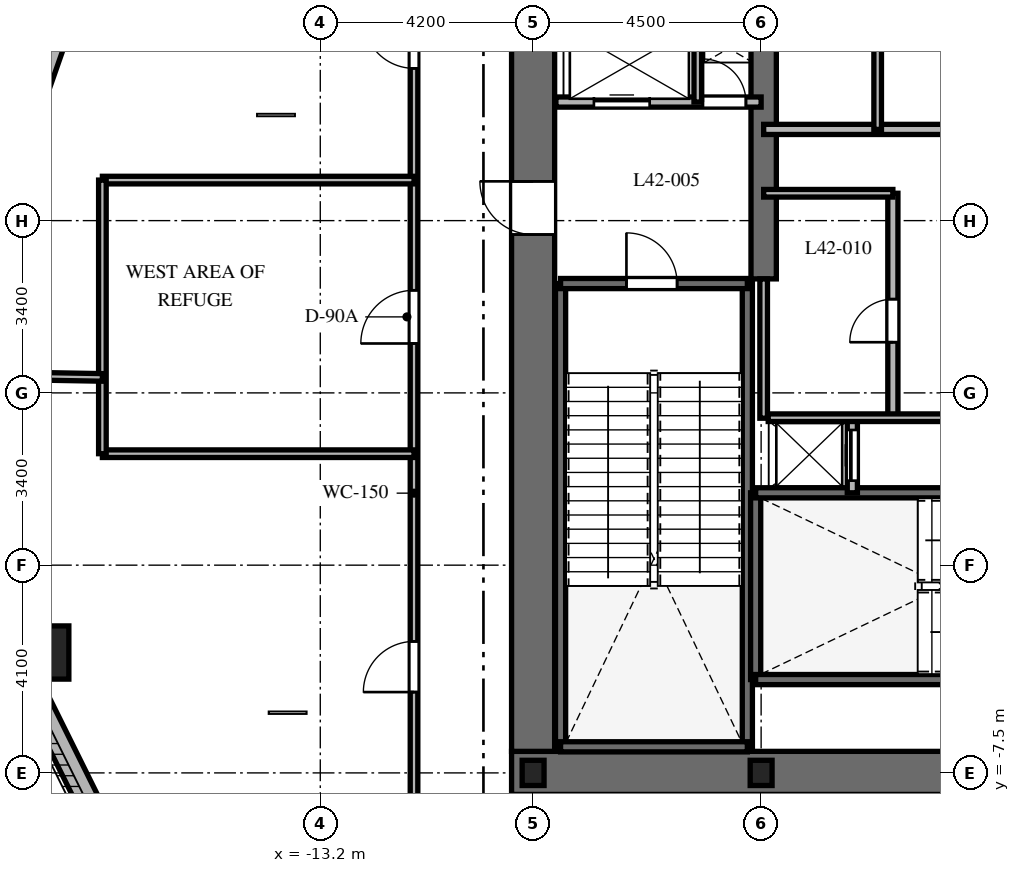
"""IFC4 building model, lengths in metres.
Left out: names, types, materials, properties, quantities, classifications, styles, units other than length and angle.
Written with IfcOpenShell. Run it as: python <this file> out.ifc"""

import sys

from ifc_helpers import new_model, si_unit, direction, frame, frame_2d, origin, origin_2d, place, context, subcontext, project, spatial, rectangle, i_section, extrude, element, fill, save


model = new_model("IFC4")
c1 = context("Model", 3, precision=1e-05, world=origin(), true_north=direction((0.0, 1.0)))
c2 = subcontext(c1, "Body", "Model", "MODEL_VIEW")
j1 = project(units=[si_unit("LENGTHUNIT", "METRE"), si_unit("PLANEANGLEUNIT", "RADIAN")], contexts=[c1])
p1 = place(None, origin())
s1 = spatial("IfcSite", under=j1, at=p1, CompositionType="ELEMENT")
p2 = place(p1, origin())
s2 = spatial("IfcBuilding", under=s1, at=p2, CompositionType="ELEMENT")
p3 = place(p2, frame((0.0, 0.0, 170.2)))
s3 = spatial("IfcBuildingStorey", under=s2, at=p3, CompositionType="ELEMENT", Elevation=170.2)
p4 = place(p3, frame((-9.425, -7.5, 0.0), z_axis=(0.0, 0.0, 1.0), x_axis=(1.0, 0.0, 0.0)))
e1 = element("IfcWall", 1, at=p4, inside=s3, PredefinedType="SHEAR", context=c2, shape_type="SweptSolid", body=[
    extrude(rectangle(XDim=18.85, YDim=0.85, at=frame_2d((9.425, 0.0))), origin(), (0.0, 0.0, 1.0), 5.4),
])
p5 = place(p4, frame((9.475, 0.0, 0.0)))
e2 = element("IfcOpeningElement", 2, at=p5, cuts=e1, PredefinedType="OPENING", context=c2, shape_type="SweptSolid", body=[
    extrude(rectangle(XDim=1.0, YDim=2.15, at=frame_2d((0.5, 1.075))), frame((0.0, 0.435, 0.0), z_axis=(0.0, -1.0, 0.0), x_axis=(1.0, 0.0, 0.0)), (0.0, 0.0, 1.0), 0.87),
])
p6 = place(p3, frame((-9.0, -7.075, 0.0), z_axis=(0.0, 0.0, 1.0), x_axis=(0.0, 1.0, 0.0)))
e3 = element("IfcWall", 3, at=p6, inside=s3, PredefinedType="SHEAR", context=c2, shape_type="SweptSolid", body=[
    extrude(rectangle(XDim=14.15, YDim=0.85, at=frame_2d((7.075, 0.0))), origin(), (0.0, 0.0, 1.0), 5.4),
])
p7 = place(p6, frame((10.2, 0.0, 0.0)))
e4 = element("IfcOpeningElement", 4, at=p7, cuts=e3, PredefinedType="OPENING", context=c2, shape_type="SweptSolid", body=[
    extrude(rectangle(XDim=1.05, YDim=2.15, at=frame_2d((0.525, 1.075))), frame((0.0, 0.435, 0.0), z_axis=(0.0, -1.0, 0.0), x_axis=(1.0, 0.0, 0.0)), (0.0, 0.0, 1.0), 0.87),
])
p8 = place(p3, frame((-4.45, 2.25, 0.0), z_axis=(0.0, 0.0, 1.0), x_axis=(0.0, 1.0, 0.0)))
e5 = element("IfcWall", 5, at=p8, inside=s3, PredefinedType="SHEAR", context=c2, shape_type="SweptSolid", body=[
    extrude(rectangle(XDim=4.825, YDim=0.5, at=frame_2d((2.413, 0.0))), origin(), (0.0, 0.0, 1.0), 5.4),
])
for number, where, z_axis, x_axis in (
    (6, (-8.458, -6.985, 0.0), (0.0, 0.0, 1.0), (0.0, 1.0, 0.0)),
    (7, (-4.772, -6.985, 0.0), (0.0, 0.0, 1.0), (0.0, 1.0, 0.0)),
):
    element("IfcWall", number, at=place(p3, frame(where, z_axis=z_axis, x_axis=x_axis)), inside=s3, PredefinedType="SHEAR", context=c2, shape_type="SweptSolid", body=[
        extrude(rectangle(XDim=9.143, YDim=0.2, at=frame_2d((4.572, 0.0))), origin(), (0.0, 0.0, 1.0), 5.4),
    ])
p9 = place(p3, frame((-8.458, -6.985, 0.0), z_axis=(0.0, 0.0, 1.0), x_axis=(1.0, 0.0, 0.0)))
e8 = element("IfcWall", 8, at=p9, inside=s3, PredefinedType="SHEAR", context=c2, shape_type="SweptSolid", body=[
    extrude(rectangle(XDim=3.686, YDim=0.2, at=frame_2d((1.843, 0.0))), origin(), (0.0, 0.0, 1.0), 5.4),
])
p10 = place(p3, frame((-8.458, 2.158, 0.0), z_axis=(0.0, 0.0, 1.0), x_axis=(1.0, 0.0, 0.0)))
e9 = element("IfcWall", 9, at=p10, inside=s3, PredefinedType="SHEAR", context=c2, shape_type="SweptSolid", body=[
    extrude(rectangle(XDim=3.686, YDim=0.2, at=frame_2d((1.843, 0.0))), origin(), (0.0, 0.0, 1.0), 5.4),
])
p11 = place(p10, frame((1.3, 0.0, 0.0)))
e10 = element("IfcOpeningElement", 10, at=p11, cuts=e9, PredefinedType="OPENING", context=c2, shape_type="SweptSolid", body=[
    extrude(rectangle(XDim=1.0, YDim=2.15, at=frame_2d((0.5, 1.075))), frame((0.0, 0.11, 0.0), z_axis=(0.0, -1.0, 0.0), x_axis=(1.0, 0.0, 0.0)), (0.0, 0.0, 1.0), 0.22),
])
p12 = place(p3, frame((-4.608, -5.658, 0.0), z_axis=(0.0, 0.0, 1.0), x_axis=(0.0, 1.0, 0.0)))
e11 = element("IfcWall", 11, at=p12, inside=s3, PredefinedType="SHEAR", context=c2, shape_type="SweptSolid", body=[
    extrude(rectangle(XDim=3.686, YDim=0.2, at=frame_2d((1.843, 0.0))), origin(), (0.0, 0.0, 1.0), 5.4),
])
p13 = place(p3, frame((-4.608, -5.658, 0.0), z_axis=(0.0, 0.0, 1.0), x_axis=(1.0, 0.0, 0.0)))
e12 = element("IfcWall", 12, at=p13, inside=s3, PredefinedType="SHEAR", context=c2, shape_type="SweptSolid", body=[
    extrude(rectangle(XDim=9.166, YDim=0.2, at=frame_2d((4.583, 0.0))), origin(), (0.0, 0.0, 1.0), 5.4),
])
p14 = place(p13, frame((7.45, 0.0, 0.0)))
e13 = element("IfcOpeningElement", 13, at=p14, cuts=e12, PredefinedType="OPENING", context=c2, shape_type="SweptSolid", body=[
    extrude(rectangle(XDim=1.0, YDim=2.15, at=frame_2d((0.5, 1.075))), frame((0.0, 0.11, 0.0), z_axis=(0.0, -1.0, 0.0), x_axis=(1.0, 0.0, 0.0)), (0.0, 0.0, 1.0), 0.22),
])
p15 = place(p3, frame((-4.608, -1.972, 0.0), z_axis=(0.0, 0.0, 1.0), x_axis=(1.0, 0.0, 0.0)))
e14 = element("IfcWall", 14, at=p15, inside=s3, PredefinedType="SHEAR", context=c2, shape_type="SweptSolid", body=[
    extrude(rectangle(XDim=9.166, YDim=0.2, at=frame_2d((4.583, 0.0))), origin(), (0.0, 0.0, 1.0), 5.4),
])
for number, where, z_axis, x_axis in (
    (15, (-9.0, -7.5, 0.0), (0.0, 0.0, 1.0), (1.0, 0.0, 0.0)),
    (16, (-4.5, -7.5, 0.0), (0.0, 0.0, 1.0), (1.0, 0.0, 0.0)),
):
    element("IfcColumn", number, at=place(p3, frame(where, z_axis=z_axis, x_axis=x_axis)), inside=s3, PredefinedType="COLUMN", context=c2, shape_type="SweptSolid", body=[
        extrude(i_section(OverallWidth=0.432, OverallDepth=0.498, WebThickness=0.056, FlangeThickness=0.089, at=origin_2d()), origin(), (0.0, 0.0, 1.0), 5.4),
    ])
p16 = place(p3, frame((-18.687, -5.124, 0.0), z_axis=(0.0, 0.0, 1.0), x_axis=(1.0, 0.0, 0.0)))
e17 = element("IfcColumn", 17, at=p16, inside=s3, PredefinedType="COLUMN", context=c2, shape_type="SweptSolid", body=[
    extrude(rectangle(XDim=1.05, YDim=1.05, at=origin_2d()), origin(), (0.0, 0.0, 1.0), 5.4),
])
p17 = place(p3, frame((-14.937, 16.993, 0.0), z_axis=(0.0, 0.0, 1.0), x_axis=(-0.330431575061, -0.943829949834, 0.0)))
e18 = element("IfcWall", 18, at=p17, inside=s3, PredefinedType="SOLIDWALL", context=c2, shape_type="SweptSolid", body=[
    extrude(rectangle(XDim=17.689, YDim=0.45, at=frame_2d((8.844, 0.0))), origin(), (0.0, 0.0, 1.0), 5.1),
])
p18 = place(p3, frame((-20.618, -2.344, 0.0), z_axis=(0.0, 0.0, 1.0), x_axis=(0.444243691097, -0.895905990002, 0.0)))
e19 = element("IfcWall", 19, at=p18, inside=s3, PredefinedType="SOLIDWALL", context=c2, shape_type="SweptSolid", body=[
    extrude(rectangle(XDim=16.784, YDim=0.45, at=frame_2d((8.392, 0.0))), origin(), (0.0, 0.0, 1.0), 5.1),
])
p19 = place(p3, frame((-8.55, 5.74, 0.0), z_axis=(0.0, 0.0, 1.0), x_axis=(1.0, 0.0, 0.0)))
e20 = element("IfcWall", 20, at=p19, inside=s3, PredefinedType="PARTITIONING", context=c2, shape_type="SweptSolid", body=[
    extrude(rectangle(XDim=4.05, YDim=0.2, at=frame_2d((2.025, 0.0))), origin(), (0.0, 0.0, 1.0), 5.1),
])
p20 = place(p19, frame((0.75, 0.0, 0.0)))
e21 = element("IfcOpeningElement", 21, at=p20, cuts=e20, PredefinedType="OPENING", context=c2, shape_type="SweptSolid", body=[
    extrude(rectangle(XDim=1.1, YDim=2.2, at=frame_2d((0.55, 1.1))), frame((0.0, 0.11, 0.0), z_axis=(0.0, -1.0, 0.0), x_axis=(1.0, 0.0, 0.0)), (0.0, 0.0, 1.0), 0.22),
])
p21 = place(p19, frame((2.9, 0.0, 0.0)))
e22 = element("IfcOpeningElement", 22, at=p21, cuts=e20, PredefinedType="OPENING", context=c2, shape_type="SweptSolid", body=[
    extrude(rectangle(XDim=0.85, YDim=2.03, at=frame_2d((0.425, 1.015))), frame((0.0, 0.11, 0.0), z_axis=(0.0, -1.0, 0.0), x_axis=(1.0, 0.0, 0.0)), (0.0, 0.0, 1.0), 0.22),
])
p22 = place(p3, frame((-5.75, 5.74, 0.0), z_axis=(0.0, 0.0, 1.0), x_axis=(0.0, 1.0, 0.0)))
e23 = element("IfcWall", 23, at=p22, inside=s3, PredefinedType="PARTITIONING", context=c2, shape_type="SweptSolid", body=[
    extrude(rectangle(XDim=1.41, YDim=0.15, at=frame_2d((0.705, 0.0))), origin(), (0.0, 0.0, 1.0), 5.1),
])
p23 = place(p3, frame((-2.7, -1.972, 0.0), z_axis=(0.0, 0.0, 1.0), x_axis=(0.0, 1.0, 0.0)))
e24 = element("IfcWall", 24, at=p23, inside=s3, PredefinedType="PARTITIONING", context=c2, shape_type="SweptSolid", body=[
    extrude(rectangle(XDim=1.472, YDim=0.2, at=frame_2d((0.736, 0.0))), origin(), (0.0, 0.0, 1.0), 5.1),
])
p24 = place(p23, frame((0.24, 0.0, 0.0)))
e25 = element("IfcOpeningElement", 25, at=p24, cuts=e24, PredefinedType="OPENING", context=c2, shape_type="SweptSolid", body=[
    extrude(rectangle(XDim=1.0, YDim=2.2, at=frame_2d((0.5, 1.1))), frame((0.0, 0.11, 0.0), z_axis=(0.0, -1.0, 0.0), x_axis=(1.0, 0.0, 0.0)), (0.0, 0.0, 1.0), 0.22),
])
p25 = place(p3, frame((-4.45, 5.2, 0.0), z_axis=(0.0, 0.0, 1.0), x_axis=(1.0, 0.0, 0.0)))
e26 = element("IfcWall", 26, at=p25, inside=s3, PredefinedType="PARTITIONING", context=c2, shape_type="SweptSolid", body=[
    extrude(rectangle(XDim=4.5, YDim=0.2, at=frame_2d((2.25, 0.0))), origin(), (0.0, 0.0, 1.0), 5.1),
])
p26 = place(p3, frame((-2.2, 5.2, 0.0), z_axis=(0.0, 0.0, 1.0), x_axis=(0.0, 1.0, 0.0)))
e27 = element("IfcWall", 27, at=p26, inside=s3, PredefinedType="PARTITIONING", context=c2, shape_type="SweptSolid", body=[
    extrude(rectangle(XDim=1.85, YDim=0.15, at=frame_2d((0.925, 0.0))), origin(), (0.0, 0.0, 1.0), 5.1),
])
p27 = place(p3, frame((-4.45, -0.5, 0.0), z_axis=(0.0, 0.0, 1.0), x_axis=(0.0, 1.0, 0.0)))
e28 = element("IfcWall", 28, at=p27, inside=s3, PredefinedType="PARTITIONING", context=c2, shape_type="SweptSolid", body=[
    extrude(rectangle(XDim=2.75, YDim=0.15, at=frame_2d((1.375, 0.0))), origin(), (0.0, 0.0, 1.0), 5.1),
])
p28 = place(p3, frame((-1.9, -0.5, 0.0), z_axis=(0.0, 0.0, 1.0), x_axis=(0.0, 1.0, 0.0)))
e29 = element("IfcWall", 29, at=p28, inside=s3, PredefinedType="PARTITIONING", context=c2, shape_type="SweptSolid", body=[
    extrude(rectangle(XDim=4.44, YDim=0.2, at=frame_2d((2.22, 0.0))), origin(), (0.0, 0.0, 1.0), 5.1),
])
p29 = place(p28, frame((1.5, 0.0, 0.0)))
e30 = element("IfcOpeningElement", 30, at=p29, cuts=e29, PredefinedType="OPENING", context=c2, shape_type="SweptSolid", body=[
    extrude(rectangle(XDim=0.85, YDim=2.03, at=frame_2d((0.425, 1.015))), frame((0.0, 0.11, 0.0), z_axis=(0.0, -1.0, 0.0), x_axis=(1.0, 0.0, 0.0)), (0.0, 0.0, 1.0), 0.22),
])
p30 = place(p3, frame((-4.45, 3.94, 0.0), z_axis=(0.0, 0.0, 1.0), x_axis=(1.0, 0.0, 0.0)))
e31 = element("IfcWall", 31, at=p30, inside=s3, PredefinedType="PARTITIONING", context=c2, shape_type="SweptSolid", body=[
    extrude(rectangle(XDim=2.55, YDim=0.15, at=frame_2d((1.275, 0.0))), origin(), (0.0, 0.0, 1.0), 5.1),
])
p31 = place(p3, frame((-4.36, -0.49, 0.0), z_axis=(0.0, 0.0, 1.0), x_axis=(1.0, 0.0, 0.0)))
e32 = element("IfcWall", 32, at=p31, inside=s3, PredefinedType="PARTITIONING", context=c2, shape_type="SweptSolid", body=[
    extrude(rectangle(XDim=8.72, YDim=0.15, at=frame_2d((4.36, 0.0))), origin(), (0.0, 0.0, 1.0), 5.1),
])
p32 = place(p31, frame((3.86, 0.0, 0.0)))
e33 = element("IfcOpeningElement", 33, at=p32, cuts=e32, PredefinedType="OPENING", context=c2, shape_type="SweptSolid", body=[
    extrude(rectangle(XDim=0.9, YDim=2.03, at=frame_2d((0.45, 1.015))), frame((0.0, 0.085, 0.0), z_axis=(0.0, -1.0, 0.0), x_axis=(1.0, 0.0, 0.0)), (0.0, 0.0, 1.0), 0.17),
])
p33 = place(p3, frame((-11.35, -9.85, 0.0), z_axis=(0.0, 0.0, 1.0), x_axis=(0.0, 1.0, 0.0)))
e34 = element("IfcWall", 34, at=p33, inside=s3, PredefinedType="PARTITIONING", context=c2, shape_type="SweptSolid", body=[
    extrude(rectangle(XDim=19.7, YDim=0.15, at=frame_2d((9.85, 0.0))), origin(), (0.0, 0.0, 1.0), 4.316),
])
p34 = place(p33, frame((10.825, 0.0, 0.0)))
e35 = element("IfcOpeningElement", 35, at=p34, cuts=e34, PredefinedType="OPENING", context=c2, shape_type="SweptSolid", body=[
    extrude(rectangle(XDim=1.05, YDim=2.15, at=frame_2d((0.525, 1.075))), frame((0.0, 0.085, 0.0), z_axis=(0.0, -1.0, 0.0), x_axis=(1.0, 0.0, 0.0)), (0.0, 0.0, 1.0), 0.17),
])
p35 = place(p33, frame((16.255, 0.0, 0.0)))
e36 = element("IfcOpeningElement", 36, at=p35, cuts=e34, PredefinedType="OPENING", context=c2, shape_type="SweptSolid", body=[
    extrude(rectangle(XDim=1.0, YDim=2.15, at=frame_2d((0.5, 1.075))), frame((0.0, 0.085, 0.0), z_axis=(0.0, -1.0, 0.0), x_axis=(1.0, 0.0, 0.0)), (0.0, 0.0, 1.0), 0.17),
])
p36 = place(p33, frame((3.945, 0.0, 0.0)))
e37 = element("IfcOpeningElement", 37, at=p36, cuts=e34, PredefinedType="OPENING", context=c2, shape_type="SweptSolid", body=[
    extrude(rectangle(XDim=1.0, YDim=2.15, at=frame_2d((0.5, 1.075))), frame((0.0, 0.085, 0.0), z_axis=(0.0, -1.0, 0.0), x_axis=(1.0, 0.0, 0.0)), (0.0, 0.0, 1.0), 0.17),
])
p37 = place(p3, frame((-17.5, -1.2, 0.0), z_axis=(0.0, 0.0, 1.0), x_axis=(1.0, 0.0, 0.0)))
e38 = element("IfcWall", 38, at=p37, inside=s3, PredefinedType="PARTITIONING", context=c2, shape_type="SweptSolid", body=[
    extrude(rectangle(XDim=6.15, YDim=0.15, at=frame_2d((3.075, 0.0))), origin(), (0.0, 0.0, 1.0), 4.541),
])
p38 = place(p3, frame((-17.5, 4.2, 0.0), z_axis=(0.0, 0.0, 1.0), x_axis=(1.0, 0.0, 0.0)))
e39 = element("IfcWall", 39, at=p38, inside=s3, PredefinedType="PARTITIONING", context=c2, shape_type="SweptSolid", body=[
    extrude(rectangle(XDim=6.15, YDim=0.15, at=frame_2d((3.075, 0.0))), origin(), (0.0, 0.0, 1.0), 4.316),
])
p39 = place(p3, frame((-17.5, -1.2, 0.0), z_axis=(0.0, 0.0, 1.0), x_axis=(0.0, 1.0, 0.0)))
e40 = element("IfcWall", 40, at=p39, inside=s3, PredefinedType="PARTITIONING", context=c2, shape_type="SweptSolid", body=[
    extrude(rectangle(XDim=5.4, YDim=0.15, at=frame_2d((2.7, 0.0))), origin(), (0.0, 0.0, 1.0), 4.316),
])
p40 = place(p3, frame((-17.5, 0.305, 0.0), z_axis=(0.0, 0.0, 1.0), x_axis=(-0.99984772798, 0.017450525889, 0.0)))
e41 = element("IfcWall", 41, at=p40, inside=s3, PredefinedType="PARTITIONING", context=c2, shape_type="SweptSolid", body=[
    extrude(rectangle(XDim=3.26, YDim=0.15, at=frame_2d((1.63, 0.0))), origin(), (0.0, 0.0, 1.0), 4.34),
])
p41 = place(p11, origin())
e42 = element("IfcDoor", 42, at=p41, inside=s3, OperationType="SINGLE_SWING_LEFT", PredefinedType="DOOR", context=c2, shape_type="SweptSolid", body=[
    extrude(rectangle(XDim=1.0, YDim=2.15, at=frame_2d((0.5, 1.075))), frame((0.0, 0.025, 0.0), z_axis=(0.0, -1.0, 0.0), x_axis=(1.0, 0.0, 0.0)), (0.0, 0.0, 1.0), 0.05),
])
fill(e10, e42)
p42 = place(p7, origin())
e43 = element("IfcDoor", 43, at=p42, inside=s3, OperationType="SINGLE_SWING_RIGHT", PredefinedType="DOOR", context=c2, shape_type="SweptSolid", body=[
    extrude(rectangle(XDim=1.05, YDim=2.15, at=frame_2d((0.525, 1.075))), frame((0.0, 0.025, 0.0), z_axis=(0.0, -1.0, 0.0), x_axis=(1.0, 0.0, 0.0)), (0.0, 0.0, 1.0), 0.05),
])
fill(e4, e43)
p43 = place(p20, origin())
e44 = element("IfcDoor", 44, at=p43, inside=s3, OperationType="SLIDING_TO_LEFT", PredefinedType="DOOR", context=c2, shape_type="SweptSolid", body=[
    extrude(rectangle(XDim=1.1, YDim=2.2, at=frame_2d((0.55, 1.1))), frame((0.0, 0.025, 0.0), z_axis=(0.0, -1.0, 0.0), x_axis=(1.0, 0.0, 0.0)), (0.0, 0.0, 1.0), 0.05),
])
fill(e21, e44)
p44 = place(p21, origin())
e45 = element("IfcDoor", 45, at=p44, inside=s3, OperationType="SINGLE_SWING_LEFT", PredefinedType="DOOR", context=c2, shape_type="SweptSolid", body=[
    extrude(rectangle(XDim=0.85, YDim=2.03, at=frame_2d((0.425, 1.015))), frame((0.0, 0.025, 0.0), z_axis=(0.0, -1.0, 0.0), x_axis=(1.0, 0.0, 0.0)), (0.0, 0.0, 1.0), 0.05),
])
fill(e22, e45)
p45 = place(p24, origin())
e46 = element("IfcDoor", 46, at=p45, inside=s3, OperationType="SLIDING_TO_LEFT", PredefinedType="DOOR", context=c2, shape_type="SweptSolid", body=[
    extrude(rectangle(XDim=1.0, YDim=2.2, at=frame_2d((0.5, 1.1))), frame((0.0, 0.025, 0.0), z_axis=(0.0, -1.0, 0.0), x_axis=(1.0, 0.0, 0.0)), (0.0, 0.0, 1.0), 0.05),
])
fill(e25, e46)
p46 = place(p29, origin())
e47 = element("IfcDoor", 47, at=p46, inside=s3, OperationType="SINGLE_SWING_LEFT", PredefinedType="DOOR", context=c2, shape_type="SweptSolid", body=[
    extrude(rectangle(XDim=0.85, YDim=2.03, at=frame_2d((0.425, 1.015))), frame((0.0, 0.025, 0.0), z_axis=(0.0, -1.0, 0.0), x_axis=(1.0, 0.0, 0.0)), (0.0, 0.0, 1.0), 0.05),
])
fill(e30, e47)
p47 = place(p34, origin())
e48 = element("IfcDoor", 48, at=p47, inside=s3, OperationType="SINGLE_SWING_LEFT", PredefinedType="DOOR", context=c2, shape_type="SweptSolid", body=[
    extrude(rectangle(XDim=1.05, YDim=2.15, at=frame_2d((0.525, 1.075))), frame((0.0, 0.025, 0.0), z_axis=(0.0, -1.0, 0.0), x_axis=(1.0, 0.0, 0.0)), (0.0, 0.0, 1.0), 0.05),
])
fill(e35, e48)
p48 = place(p35, origin())
e49 = element("IfcDoor", 49, at=p48, inside=s3, OperationType="SINGLE_SWING_RIGHT", PredefinedType="DOOR", context=c2, shape_type="SweptSolid", body=[
    extrude(rectangle(XDim=1.0, YDim=2.15, at=frame_2d((0.5, 1.075))), frame((0.0, 0.025, 0.0), z_axis=(0.0, -1.0, 0.0), x_axis=(1.0, 0.0, 0.0)), (0.0, 0.0, 1.0), 0.05),
])
fill(e36, e49)
p49 = place(p36, origin())
e50 = element("IfcDoor", 50, at=p49, inside=s3, OperationType="SINGLE_SWING_LEFT", PredefinedType="DOOR", context=c2, shape_type="SweptSolid", body=[
    extrude(rectangle(XDim=1.0, YDim=2.15, at=frame_2d((0.5, 1.075))), frame((0.0, 0.025, 0.0), z_axis=(0.0, -1.0, 0.0), x_axis=(1.0, 0.0, 0.0)), (0.0, 0.0, 1.0), 0.05),
])
fill(e37, e50)
save(model, sys.argv[1])
